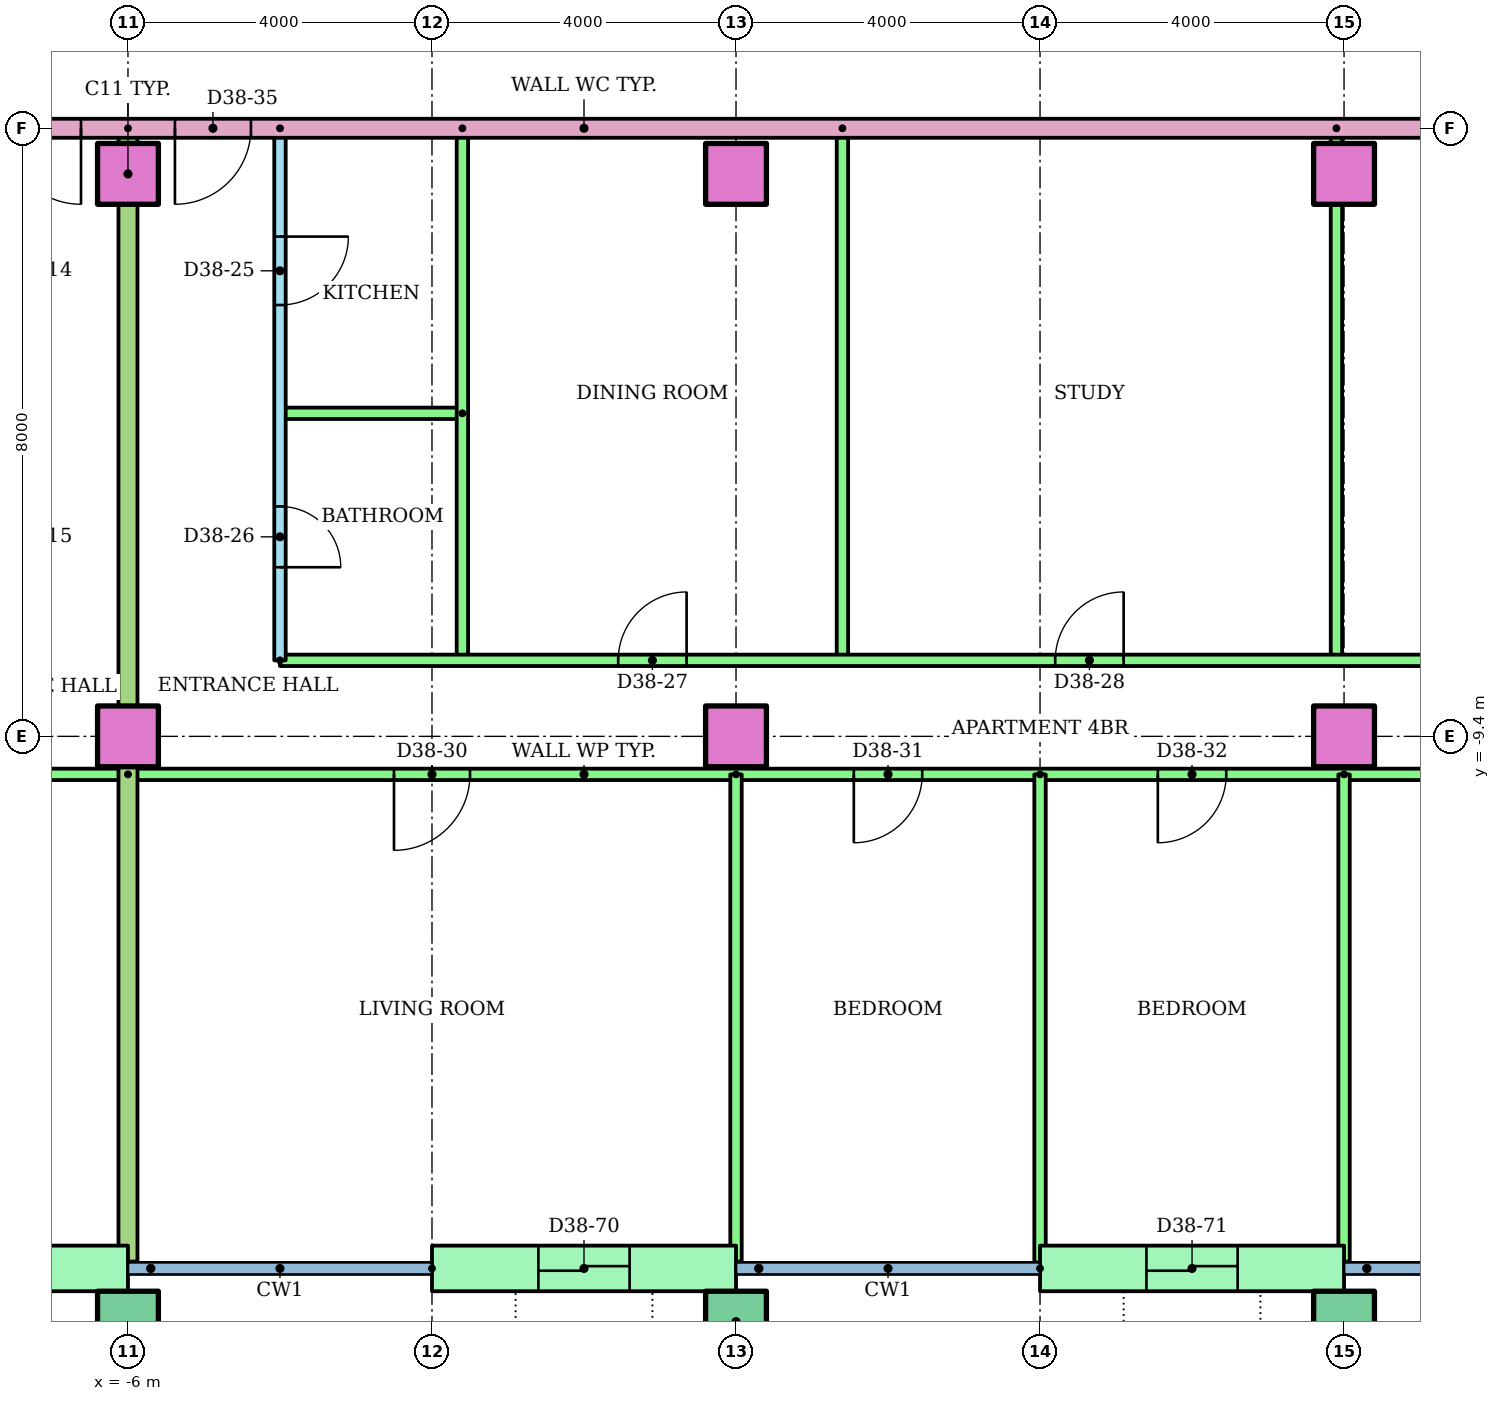
"""IFC4 building model, lengths in metres.
Left out: names, types, materials, properties, quantities, classifications, styles, units other than length and angle.
Written with IfcOpenShell. Run it as: python <this file> out.ifc"""

import sys

from ifc_helpers import new_model, si_unit, direction, frame, frame_2d, origin, origin_2d, place, context, subcontext, project, spatial, rectangle, hollow_rectangle, extrude, element, fill, save


model = new_model("IFC4")
c1 = context("Model", 3, precision=1e-05, world=origin(), true_north=direction((0.0, 1.0)))
c2 = subcontext(c1, "Body", "Model", "MODEL_VIEW")
j1 = project(units=[si_unit("LENGTHUNIT", "METRE"), si_unit("PLANEANGLEUNIT", "RADIAN")], contexts=[c1])
p1 = place(None, origin())
s1 = spatial("IfcSite", under=j1, at=p1, CompositionType="ELEMENT")
p2 = place(p1, origin())
s2 = spatial("IfcBuilding", under=s1, at=p2, CompositionType="ELEMENT")
p3 = place(p2, frame((0.0, 0.0, 145.4)))
s3 = spatial("IfcBuildingStorey", under=s2, at=p3, CompositionType="ELEMENT", Elevation=145.4)
for number, where in (
    (1, (-6.0, -17.1, 0.0)),
    (2, (2.0, -17.1, 0.0)),
    (3, (10.0, -17.1, 0.0)),
):
    element("IfcColumn", number, at=place(p3, frame(where)), inside=s3, PredefinedType="COLUMN", context=c2, shape_type="SweptSolid", body=[
        extrude(hollow_rectangle(XDim=0.8, YDim=0.8, WallThickness=0.04, at=origin_2d()), origin(), (0.0, 0.0, 1.0), 3.2),
    ])
for number, where in (
    (4, (-6.0, -9.4, 0.0)),
    (5, (2.0, -9.4, 0.0)),
    (6, (10.0, -9.4, 0.0)),
    (7, (-6.0, -2.0, 0.0)),
    (8, (2.0, -2.0, 0.0)),
    (9, (10.0, -2.0, 0.0)),
):
    element("IfcColumn", number, at=place(p3, frame(where)), inside=s3, PredefinedType="COLUMN", context=c2, shape_type="SweptSolid", body=[
        extrude(rectangle(XDim=0.8, YDim=0.8, at=origin_2d()), origin(), (0.0, 0.0, 1.0), 3.2),
    ])
p4 = place(p3, frame((-10.0, -16.4, 0.0)))
e10 = element("IfcWall", 10, at=p4, inside=s3, PredefinedType="STANDARD", context=c2, shape_type="SweptSolid", body=[
    extrude(rectangle(XDim=4.0, YDim=0.6, at=frame_2d((2.0, 0.0))), origin(), (0.0, 0.0, 1.0), 2.92),
])
p5 = place(p4, frame((1.4, 0.0, 0.0)))
e11 = element("IfcOpeningElement", 11, at=p5, cuts=e10, PredefinedType="OPENING", context=c2, shape_type="SweptSolid", body=[
    extrude(rectangle(XDim=1.2, YDim=2.1, at=frame_2d((0.6, 1.05))), frame((0.0, 0.31, 0.0), z_axis=(0.0, -1.0, 0.0), x_axis=(1.0, 0.0, 0.0)), (0.0, 0.0, 1.0), 0.62),
])
p6 = place(p3, frame((-2.0, -16.4, 0.0)))
e12 = element("IfcWall", 12, at=p6, inside=s3, PredefinedType="STANDARD", context=c2, shape_type="SweptSolid", body=[
    extrude(rectangle(XDim=4.0, YDim=0.6, at=frame_2d((2.0, 0.0))), origin(), (0.0, 0.0, 1.0), 2.92),
])
p7 = place(p6, frame((1.4, 0.0, 0.0)))
e13 = element("IfcOpeningElement", 13, at=p7, cuts=e12, PredefinedType="OPENING", context=c2, shape_type="SweptSolid", body=[
    extrude(rectangle(XDim=1.2, YDim=2.1, at=frame_2d((0.6, 1.05))), frame((0.0, 0.31, 0.0), z_axis=(0.0, -1.0, 0.0), x_axis=(1.0, 0.0, 0.0)), (0.0, 0.0, 1.0), 0.62),
])
p8 = place(p3, frame((6.0, -16.4, 0.0)))
e14 = element("IfcWall", 14, at=p8, inside=s3, PredefinedType="STANDARD", context=c2, shape_type="SweptSolid", body=[
    extrude(rectangle(XDim=4.0, YDim=0.6, at=frame_2d((2.0, 0.0))), origin(), (0.0, 0.0, 1.0), 2.92),
])
p9 = place(p8, frame((1.4, 0.0, 0.0)))
e15 = element("IfcOpeningElement", 15, at=p9, cuts=e14, PredefinedType="OPENING", context=c2, shape_type="SweptSolid", body=[
    extrude(rectangle(XDim=1.2, YDim=2.1, at=frame_2d((0.6, 1.05))), frame((0.0, 0.31, 0.0), z_axis=(0.0, -1.0, 0.0), x_axis=(1.0, 0.0, 0.0)), (0.0, 0.0, 1.0), 0.62),
])
p10 = place(p3, frame((-6.0, -9.9, 0.0), z_axis=(0.0, 0.0, 1.0), x_axis=(-1.0, 0.0, 0.0)))
e16 = element("IfcWall", 16, at=p10, inside=s3, PredefinedType="PARTITIONING", context=c2, shape_type="SweptSolid", body=[
    extrude(rectangle(XDim=26.72, YDim=0.15, at=frame_2d((13.36, 0.0))), origin(), (0.0, 0.0, 1.0), 2.4),
])
p11 = place(p10, frame((20.75, 0.0, 0.0)))
e17 = element("IfcOpeningElement", 17, at=p11, cuts=e16, PredefinedType="OPENING", context=c2, shape_type="SweptSolid", body=[
    extrude(rectangle(XDim=1.0, YDim=2.1, at=frame_2d((0.5, 1.05))), frame((0.0, 0.085, 0.0), z_axis=(0.0, -1.0, 0.0), x_axis=(1.0, 0.0, 0.0)), (0.0, 0.0, 1.0), 0.17),
])
p12 = place(p10, frame((13.55, 0.0, 0.0)))
e18 = element("IfcOpeningElement", 18, at=p12, cuts=e16, PredefinedType="OPENING", context=c2, shape_type="SweptSolid", body=[
    extrude(rectangle(XDim=0.9, YDim=2.1, at=frame_2d((0.45, 1.05))), frame((0.0, 0.085, 0.0), z_axis=(0.0, -1.0, 0.0), x_axis=(1.0, 0.0, 0.0)), (0.0, 0.0, 1.0), 0.17),
])
p13 = place(p10, frame((9.55, 0.0, 0.0)))
e19 = element("IfcOpeningElement", 19, at=p13, cuts=e16, PredefinedType="OPENING", context=c2, shape_type="SweptSolid", body=[
    extrude(rectangle(XDim=0.9, YDim=2.1, at=frame_2d((0.45, 1.05))), frame((0.0, 0.085, 0.0), z_axis=(0.0, -1.0, 0.0), x_axis=(1.0, 0.0, 0.0)), (0.0, 0.0, 1.0), 0.17),
])
p14 = place(p10, frame((5.55, 0.0, 0.0)))
e20 = element("IfcOpeningElement", 20, at=p14, cuts=e16, PredefinedType="OPENING", context=c2, shape_type="SweptSolid", body=[
    extrude(rectangle(XDim=0.9, YDim=2.1, at=frame_2d((0.45, 1.05))), frame((0.0, 0.085, 0.0), z_axis=(0.0, -1.0, 0.0), x_axis=(1.0, 0.0, 0.0)), (0.0, 0.0, 1.0), 0.17),
])
p15 = place(p10, frame((1.55, 0.0, 0.0)))
e21 = element("IfcOpeningElement", 21, at=p15, cuts=e16, PredefinedType="OPENING", context=c2, shape_type="SweptSolid", body=[
    extrude(rectangle(XDim=0.9, YDim=2.1, at=frame_2d((0.45, 1.05))), frame((0.0, 0.085, 0.0), z_axis=(0.0, -1.0, 0.0), x_axis=(1.0, 0.0, 0.0)), (0.0, 0.0, 1.0), 0.17),
])
p16 = place(p3, frame((-4.0, -1.4, 0.0), z_axis=(0.0, 0.0, 1.0), x_axis=(0.0, -1.0, 0.0)))
e22 = element("IfcWall", 22, at=p16, inside=s3, PredefinedType="PARTITIONING", context=c2, shape_type="SweptSolid", body=[
    extrude(rectangle(XDim=7.0, YDim=0.15, at=frame_2d((3.5, 0.0))), origin(), (0.0, 0.0, 1.0), 2.4),
])
p17 = place(p16, frame((1.425, 0.0, 0.0)))
e23 = element("IfcOpeningElement", 23, at=p17, cuts=e22, PredefinedType="OPENING", context=c2, shape_type="SweptSolid", body=[
    extrude(rectangle(XDim=0.9, YDim=2.1, at=frame_2d((0.45, 1.05))), frame((0.0, 0.085, 0.0), z_axis=(0.0, -1.0, 0.0), x_axis=(1.0, 0.0, 0.0)), (0.0, 0.0, 1.0), 0.17),
])
p18 = place(p16, frame((4.975, 0.0, 0.0)))
e24 = element("IfcOpeningElement", 24, at=p18, cuts=e22, PredefinedType="OPENING", context=c2, shape_type="SweptSolid", body=[
    extrude(rectangle(XDim=0.8, YDim=2.1, at=frame_2d((0.4, 1.05))), frame((0.0, 0.085, 0.0), z_axis=(0.0, -1.0, 0.0), x_axis=(1.0, 0.0, 0.0)), (0.0, 0.0, 1.0), 0.17),
])
p19 = place(p3, frame((-1.6, -5.15, 0.0), z_axis=(0.0, 0.0, 1.0), x_axis=(-1.0, 0.0, 0.0)))
e25 = element("IfcWall", 25, at=p19, inside=s3, PredefinedType="PARTITIONING", context=c2, shape_type="SweptSolid", body=[
    extrude(rectangle(XDim=2.4, YDim=0.15, at=frame_2d((1.2, 0.0))), origin(), (0.0, 0.0, 1.0), 2.4),
])
for number, where, z_axis, x_axis in (
    (26, (-1.6, -1.4, 0.0), (0.0, 0.0, 1.0), (0.0, -1.0, 0.0)),
    (27, (3.4, -1.4, 0.0), (0.0, 0.0, 1.0), (0.0, -1.0, 0.0)),
    (28, (9.9, -1.4, 0.0), (0.0, 0.0, 1.0), (0.0, -1.0, 0.0)),
):
    element("IfcWall", number, at=place(p3, frame(where, z_axis=z_axis, x_axis=x_axis)), inside=s3, PredefinedType="PARTITIONING", context=c2, shape_type="SweptSolid", body=[
        extrude(rectangle(XDim=7.0, YDim=0.15, at=frame_2d((3.5, 0.0))), origin(), (0.0, 0.0, 1.0), 2.4),
    ])
p20 = place(p3, frame((-4.0, -8.4, 0.0)))
e29 = element("IfcWall", 29, at=p20, inside=s3, PredefinedType="PARTITIONING", context=c2, shape_type="SweptSolid", body=[
    extrude(rectangle(XDim=22.0, YDim=0.15, at=frame_2d((11.0, 0.0))), origin(), (0.0, 0.0, 1.0), 2.4),
])
p21 = place(p20, frame((4.45, 0.0, 0.0)))
e30 = element("IfcOpeningElement", 30, at=p21, cuts=e29, PredefinedType="OPENING", context=c2, shape_type="SweptSolid", body=[
    extrude(rectangle(XDim=0.9, YDim=2.1, at=frame_2d((0.45, 1.05))), frame((0.0, 0.085, 0.0), z_axis=(0.0, -1.0, 0.0), x_axis=(1.0, 0.0, 0.0)), (0.0, 0.0, 1.0), 0.17),
])
p22 = place(p20, frame((10.2, 0.0, 0.0)))
e31 = element("IfcOpeningElement", 31, at=p22, cuts=e29, PredefinedType="OPENING", context=c2, shape_type="SweptSolid", body=[
    extrude(rectangle(XDim=0.9, YDim=2.1, at=frame_2d((0.45, 1.05))), frame((0.0, 0.085, 0.0), z_axis=(0.0, -1.0, 0.0), x_axis=(1.0, 0.0, 0.0)), (0.0, 0.0, 1.0), 0.17),
])
p23 = place(p20, frame((17.5, 0.0, 0.0)))
e32 = element("IfcOpeningElement", 32, at=p23, cuts=e29, PredefinedType="OPENING", context=c2, shape_type="SweptSolid", body=[
    extrude(rectangle(XDim=0.9, YDim=2.1, at=frame_2d((0.45, 1.05))), frame((0.0, 0.085, 0.0), z_axis=(0.0, -1.0, 0.0), x_axis=(1.0, 0.0, 0.0)), (0.0, 0.0, 1.0), 0.17),
])
p24 = place(p3, frame((18.0, -9.9, 0.0), z_axis=(0.0, 0.0, 1.0), x_axis=(-1.0, 0.0, 0.0)))
e33 = element("IfcWall", 33, at=p24, inside=s3, PredefinedType="PARTITIONING", context=c2, shape_type="SweptSolid", body=[
    extrude(rectangle(XDim=24.0, YDim=0.15, at=frame_2d((12.0, 0.0))), origin(), (0.0, 0.0, 1.0), 2.4),
])
p25 = place(p24, frame((19.5, 0.0, 0.0)))
e34 = element("IfcOpeningElement", 34, at=p25, cuts=e33, PredefinedType="OPENING", context=c2, shape_type="SweptSolid", body=[
    extrude(rectangle(XDim=1.0, YDim=2.1, at=frame_2d((0.5, 1.05))), frame((0.0, 0.085, 0.0), z_axis=(0.0, -1.0, 0.0), x_axis=(1.0, 0.0, 0.0)), (0.0, 0.0, 1.0), 0.17),
])
p26 = place(p24, frame((13.55, 0.0, 0.0)))
e35 = element("IfcOpeningElement", 35, at=p26, cuts=e33, PredefinedType="OPENING", context=c2, shape_type="SweptSolid", body=[
    extrude(rectangle(XDim=0.9, YDim=2.1, at=frame_2d((0.45, 1.05))), frame((0.0, 0.085, 0.0), z_axis=(0.0, -1.0, 0.0), x_axis=(1.0, 0.0, 0.0)), (0.0, 0.0, 1.0), 0.17),
])
p27 = place(p24, frame((9.55, 0.0, 0.0)))
e36 = element("IfcOpeningElement", 36, at=p27, cuts=e33, PredefinedType="OPENING", context=c2, shape_type="SweptSolid", body=[
    extrude(rectangle(XDim=0.9, YDim=2.1, at=frame_2d((0.45, 1.05))), frame((0.0, 0.085, 0.0), z_axis=(0.0, -1.0, 0.0), x_axis=(1.0, 0.0, 0.0)), (0.0, 0.0, 1.0), 0.17),
])
p28 = place(p24, frame((5.55, 0.0, 0.0)))
e37 = element("IfcOpeningElement", 37, at=p28, cuts=e33, PredefinedType="OPENING", context=c2, shape_type="SweptSolid", body=[
    extrude(rectangle(XDim=0.9, YDim=2.1, at=frame_2d((0.45, 1.05))), frame((0.0, 0.085, 0.0), z_axis=(0.0, -1.0, 0.0), x_axis=(1.0, 0.0, 0.0)), (0.0, 0.0, 1.0), 0.17),
])
p29 = place(p24, frame((1.55, 0.0, 0.0)))
e38 = element("IfcOpeningElement", 38, at=p29, cuts=e33, PredefinedType="OPENING", context=c2, shape_type="SweptSolid", body=[
    extrude(rectangle(XDim=0.9, YDim=2.1, at=frame_2d((0.45, 1.05))), frame((0.0, 0.085, 0.0), z_axis=(0.0, -1.0, 0.0), x_axis=(1.0, 0.0, 0.0)), (0.0, 0.0, 1.0), 0.17),
])
p30 = place(p3, frame((2.0, -9.9, 0.0), z_axis=(0.0, 0.0, 1.0), x_axis=(0.0, -1.0, 0.0)))
e39 = element("IfcWall", 39, at=p30, inside=s3, PredefinedType="PARTITIONING", context=c2, shape_type="SweptSolid", body=[
    extrude(rectangle(XDim=6.41, YDim=0.15, at=frame_2d((3.205, 0.0))), origin(), (0.0, 0.0, 1.0), 2.4),
])
p31 = place(p3, frame((6.0, -9.9, 0.0), z_axis=(0.0, 0.0, 1.0), x_axis=(0.0, -1.0, 0.0)))
e40 = element("IfcWall", 40, at=p31, inside=s3, PredefinedType="PARTITIONING", context=c2, shape_type="SweptSolid", body=[
    extrude(rectangle(XDim=6.421, YDim=0.15, at=frame_2d((3.21, 0.0))), origin(), (0.0, 0.0, 1.0), 2.4),
])
p32 = place(p3, frame((10.0, -9.9, 0.0), z_axis=(0.0, 0.0, 1.0), x_axis=(0.0, -1.0, 0.0)))
e41 = element("IfcWall", 41, at=p32, inside=s3, PredefinedType="PARTITIONING", context=c2, shape_type="SweptSolid", body=[
    extrude(rectangle(XDim=6.41, YDim=0.15, at=frame_2d((3.205, 0.0))), origin(), (0.0, 0.0, 1.0), 2.4),
])
p33 = place(p3, frame((-6.0, -1.4, 0.0), z_axis=(0.0, 0.0, 1.0), x_axis=(0.0, -1.0, 0.0)))
e42 = element("IfcWall", 42, at=p33, inside=s3, PredefinedType="PARTITIONING", context=c2, shape_type="SweptSolid", body=[
    extrude(rectangle(XDim=14.91, YDim=0.25, at=frame_2d((7.455, 0.0))), origin(), (0.0, 0.0, 1.0), 2.4),
])
p34 = place(p3, frame((14.0, -1.4, 0.0), z_axis=(0.0, 0.0, 1.0), x_axis=(-1.0, 0.0, 0.0)))
e43 = element("IfcWall", 43, at=p34, inside=s3, PredefinedType="PARTITIONING", context=c2, shape_type="SweptSolid", body=[
    extrude(rectangle(XDim=28.0, YDim=0.25, at=frame_2d((14.0, 0.0))), origin(), (0.0, 0.0, 1.0), 2.4),
])
p35 = place(p34, frame((20.618, 0.0, 0.0)))
e44 = element("IfcOpeningElement", 44, at=p35, cuts=e43, PredefinedType="OPENING", context=c2, shape_type="SweptSolid", body=[
    extrude(rectangle(XDim=1.0, YDim=2.1, at=frame_2d((0.5, 1.05))), frame((0.0, 0.135, 0.0), z_axis=(0.0, -1.0, 0.0), x_axis=(1.0, 0.0, 0.0)), (0.0, 0.0, 1.0), 0.27),
])
p36 = place(p34, frame((18.382, 0.0, 0.0)))
e45 = element("IfcOpeningElement", 45, at=p36, cuts=e43, PredefinedType="OPENING", context=c2, shape_type="SweptSolid", body=[
    extrude(rectangle(XDim=1.0, YDim=2.1, at=frame_2d((0.5, 1.05))), frame((0.0, 0.135, 0.0), z_axis=(0.0, -1.0, 0.0), x_axis=(1.0, 0.0, 0.0)), (0.0, 0.0, 1.0), 0.27),
])
p37 = place(p35, origin())
e46 = element("IfcDoor", 46, at=p37, inside=s3, OperationType="SINGLE_SWING_LEFT", PredefinedType="DOOR", context=c2, shape_type="SweptSolid", body=[
    extrude(rectangle(XDim=1.0, YDim=2.1, at=frame_2d((0.5, 1.05))), frame((0.0, 0.025, 0.0), z_axis=(0.0, -1.0, 0.0), x_axis=(1.0, 0.0, 0.0)), (0.0, 0.0, 1.0), 0.05),
])
fill(e44, e46)
p38 = place(p17, origin())
e47 = element("IfcDoor", 47, at=p38, inside=s3, OperationType="SINGLE_SWING_LEFT", PredefinedType="DOOR", context=c2, shape_type="SweptSolid", body=[
    extrude(rectangle(XDim=0.9, YDim=2.1, at=frame_2d((0.45, 1.05))), frame((0.0, 0.025, 0.0), z_axis=(0.0, -1.0, 0.0), x_axis=(1.0, 0.0, 0.0)), (0.0, 0.0, 1.0), 0.05),
])
fill(e23, e47)
p39 = place(p18, origin())
e48 = element("IfcDoor", 48, at=p39, inside=s3, OperationType="SINGLE_SWING_RIGHT", PredefinedType="DOOR", context=c2, shape_type="SweptSolid", body=[
    extrude(rectangle(XDim=0.8, YDim=2.1, at=frame_2d((0.4, 1.05))), frame((0.0, 0.025, 0.0), z_axis=(0.0, -1.0, 0.0), x_axis=(1.0, 0.0, 0.0)), (0.0, 0.0, 1.0), 0.05),
])
fill(e24, e48)
p40 = place(p21, origin())
e49 = element("IfcDoor", 49, at=p40, inside=s3, OperationType="SINGLE_SWING_RIGHT", PredefinedType="DOOR", context=c2, shape_type="SweptSolid", body=[
    extrude(rectangle(XDim=0.9, YDim=2.1, at=frame_2d((0.45, 1.05))), frame((0.0, 0.025, 0.0), z_axis=(0.0, -1.0, 0.0), x_axis=(1.0, 0.0, 0.0)), (0.0, 0.0, 1.0), 0.05),
])
fill(e30, e49)
p41 = place(p22, origin())
e50 = element("IfcDoor", 50, at=p41, inside=s3, OperationType="SINGLE_SWING_RIGHT", PredefinedType="DOOR", context=c2, shape_type="SweptSolid", body=[
    extrude(rectangle(XDim=0.9, YDim=2.1, at=frame_2d((0.45, 1.05))), frame((0.0, 0.025, 0.0), z_axis=(0.0, -1.0, 0.0), x_axis=(1.0, 0.0, 0.0)), (0.0, 0.0, 1.0), 0.05),
])
fill(e31, e50)
p42 = place(p25, origin())
e51 = element("IfcDoor", 51, at=p42, inside=s3, OperationType="SINGLE_SWING_RIGHT", PredefinedType="DOOR", context=c2, shape_type="SweptSolid", body=[
    extrude(rectangle(XDim=1.0, YDim=2.1, at=frame_2d((0.5, 1.05))), frame((0.0, 0.025, 0.0), z_axis=(0.0, -1.0, 0.0), x_axis=(1.0, 0.0, 0.0)), (0.0, 0.0, 1.0), 0.05),
])
fill(e34, e51)
p43 = place(p26, origin())
e52 = element("IfcDoor", 52, at=p43, inside=s3, OperationType="SINGLE_SWING_RIGHT", PredefinedType="DOOR", context=c2, shape_type="SweptSolid", body=[
    extrude(rectangle(XDim=0.9, YDim=2.1, at=frame_2d((0.45, 1.05))), frame((0.0, 0.025, 0.0), z_axis=(0.0, -1.0, 0.0), x_axis=(1.0, 0.0, 0.0)), (0.0, 0.0, 1.0), 0.05),
])
fill(e35, e52)
p44 = place(p27, origin())
e53 = element("IfcDoor", 53, at=p44, inside=s3, OperationType="SINGLE_SWING_RIGHT", PredefinedType="DOOR", context=c2, shape_type="SweptSolid", body=[
    extrude(rectangle(XDim=0.9, YDim=2.1, at=frame_2d((0.45, 1.05))), frame((0.0, 0.025, 0.0), z_axis=(0.0, -1.0, 0.0), x_axis=(1.0, 0.0, 0.0)), (0.0, 0.0, 1.0), 0.05),
])
fill(e36, e53)
p45 = place(p36, origin())
e54 = element("IfcDoor", 54, at=p45, inside=s3, OperationType="SINGLE_SWING_RIGHT", PredefinedType="DOOR", context=c2, shape_type="SweptSolid", body=[
    extrude(rectangle(XDim=1.0, YDim=2.1, at=frame_2d((0.5, 1.05))), frame((0.0, 0.025, 0.0), z_axis=(0.0, -1.0, 0.0), x_axis=(1.0, 0.0, 0.0)), (0.0, 0.0, 1.0), 0.05),
])
fill(e45, e54)
p46 = place(p7, origin())
e55 = element("IfcDoor", 55, at=p46, inside=s3, OperationType="SLIDING_TO_LEFT", PredefinedType="DOOR", context=c2, shape_type="SweptSolid", body=[
    extrude(rectangle(XDim=1.2, YDim=2.1, at=frame_2d((0.6, 1.05))), frame((0.0, 0.025, 0.0), z_axis=(0.0, -1.0, 0.0), x_axis=(1.0, 0.0, 0.0)), (0.0, 0.0, 1.0), 0.05),
])
fill(e13, e55)
p47 = place(p9, origin())
e56 = element("IfcDoor", 56, at=p47, inside=s3, OperationType="SLIDING_TO_LEFT", PredefinedType="DOOR", context=c2, shape_type="SweptSolid", body=[
    extrude(rectangle(XDim=1.2, YDim=2.1, at=frame_2d((0.6, 1.05))), frame((0.0, 0.025, 0.0), z_axis=(0.0, -1.0, 0.0), x_axis=(1.0, 0.0, 0.0)), (0.0, 0.0, 1.0), 0.05),
])
fill(e15, e56)
save(model, sys.argv[1])
